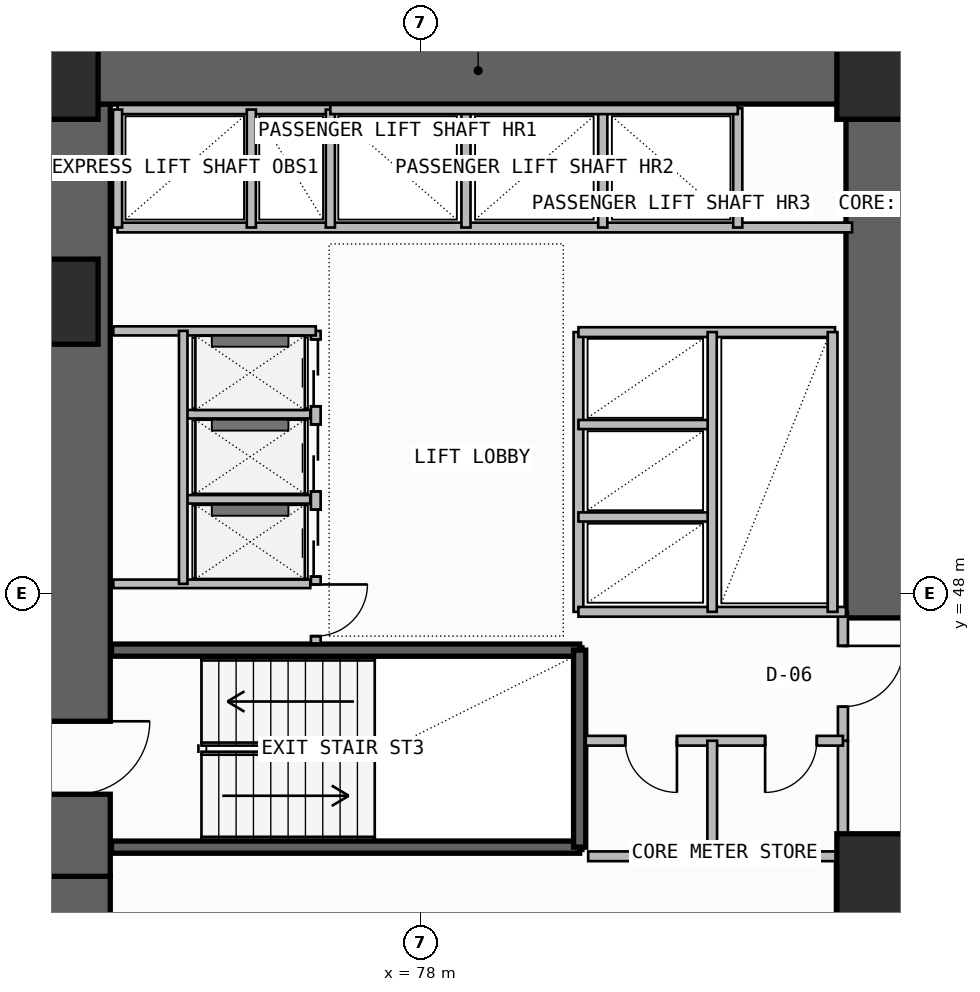
"""IFC4 building model, lengths in metres.
Left out: names, types, materials, properties, quantities, classifications, styles, units other than length and angle.
Written with IfcOpenShell. Run it as: python <this file> out.ifc"""

import sys

from ifc_helpers import new_model, si_unit, direction, frame, frame_2d, origin, origin_2d, place, context, subcontext, project, spatial, rectangle, extrude, element, fill, save


model = new_model("IFC4")
c1 = context("Model", 3, precision=1e-05, world=origin(), true_north=direction((0.0, 1.0)))
c2 = subcontext(c1, "Body", "Model", "MODEL_VIEW")
j1 = project(units=[si_unit("LENGTHUNIT", "METRE"), si_unit("PLANEANGLEUNIT", "RADIAN")], contexts=[c1])
p1 = place(None, origin())
s1 = spatial("IfcSite", under=j1, at=p1, CompositionType="ELEMENT")
p2 = place(p1, origin())
s2 = spatial("IfcBuilding", under=s1, at=p2, CompositionType="ELEMENT")
p3 = place(p2, frame((0.0, 0.0, 33.9)))
s3 = spatial("IfcBuildingStorey", under=s2, at=p3, CompositionType="ELEMENT", Elevation=33.9)
p4 = place(p3, frame((72.35, 35.5, -0.2), z_axis=(0.0, 0.0, 1.0), x_axis=(0.0, 1.0, 0.0)))
e1 = element("IfcWall", 1, at=p4, inside=s3, PredefinedType="SHEAR", context=c2, shape_type="SweptSolid", body=[
    extrude(rectangle(XDim=7.85, YDim=1.1, at=frame_2d((3.925, 0.0))), origin(), (0.0, 0.0, 1.0), 3.54),
])
p5 = place(p4, frame((1.45, 0.0, 0.2)))
e2 = element("IfcOpeningElement", 2, at=p5, cuts=e1, PredefinedType="OPENING", context=c2, shape_type="SweptSolid", body=[
    extrude(rectangle(XDim=1.2, YDim=2.2, at=frame_2d((0.6, 1.1))), frame((0.0, 0.56, 0.0), z_axis=(0.0, -1.0, 0.0), x_axis=(1.0, 0.0, 0.0)), (0.0, 0.0, 1.0), 1.12),
])
p6 = place(p3, frame((72.35, 43.35, -0.2), z_axis=(0.0, 0.0, 1.0), x_axis=(0.0, 1.0, 0.0)))
e3 = element("IfcWall", 3, at=p6, inside=s3, PredefinedType="SHEAR", context=c2, shape_type="SweptSolid", body=[
    extrude(rectangle(XDim=12.7, YDim=1.1, at=frame_2d((6.35, 0.0))), origin(), (0.0, 0.0, 1.0), 3.54),
])
p7 = place(p6, frame((1.35, 0.0, 0.2)))
e4 = element("IfcOpeningElement", 4, at=p7, cuts=e3, PredefinedType="OPENING", context=c2, shape_type="SweptSolid", body=[
    extrude(rectangle(XDim=1.2, YDim=2.2, at=frame_2d((0.6, 1.1))), frame((0.0, 0.56, 0.0), z_axis=(0.0, -1.0, 0.0), x_axis=(1.0, 0.0, 0.0)), (0.0, 0.0, 1.0), 1.12),
])
p8 = place(p3, frame((71.8, 56.6, -0.2), z_axis=(0.0, 0.0, 1.0), x_axis=(1.0, 0.0, 0.0)))
e5 = element("IfcWall", 5, at=p8, inside=s3, PredefinedType="SHEAR", context=c2, shape_type="SweptSolid", body=[
    extrude(rectangle(XDim=14.3, YDim=1.1, at=frame_2d((7.15, 0.0))), origin(), (0.0, 0.0, 1.0), 3.54),
])
p9 = place(p3, frame((85.55, 47.6, -0.2), z_axis=(0.0, 0.0, 1.0), x_axis=(0.0, 1.0, 0.0)))
e6 = element("IfcWall", 6, at=p9, inside=s3, PredefinedType="SHEAR", context=c2, shape_type="SweptSolid", body=[
    extrude(rectangle(XDim=8.45, YDim=1.1, at=frame_2d((4.225, 0.0))), origin(), (0.0, 0.0, 1.0), 3.54),
])
for number, where, z_axis, x_axis in (
    (7, (85.55, 43.35, 0.0), (0.0, 0.0, 1.0), (1.0, 0.0, 0.0)),
    (8, (72.0, 52.8, 0.0), (0.0, 0.0, 1.0), (1.0, 0.0, 0.0)),
    (9, (72.0, 56.5, 0.0), (0.0, 0.0, 1.0), (1.0, 0.0, 0.0)),
    (10, (85.55, 56.5, 0.0), (0.0, 0.0, 1.0), (1.0, 0.0, 0.0)),
):
    element("IfcColumn", number, at=place(p3, frame(where, z_axis=z_axis, x_axis=x_axis)), inside=s3, PredefinedType="COLUMN", context=c2, shape_type="SweptSolid", body=[
        extrude(rectangle(XDim=1.4, YDim=1.4, at=origin_2d()), origin(), (0.0, 0.0, 1.0), 3.6),
    ])
p10 = place(p3, frame((84.92, 38.85, 0.0), z_axis=(0.0, 0.0, 1.0), x_axis=(0.0, 1.0, 0.0)))
e11 = element("IfcWall", 11, at=p10, inside=s3, PredefinedType="SOLIDWALL", context=c2, shape_type="SweptSolid", body=[
    extrude(rectangle(XDim=4.83, YDim=0.2, at=frame_2d((2.415, 0.0))), origin(), (0.0, 0.0, 1.0), 3.34),
])
p11 = place(p10, frame((1.25, 0.0, 0.0)))
e12 = element("IfcOpeningElement", 12, at=p11, cuts=e11, PredefinedType="OPENING", context=c2, shape_type="SweptSolid", body=[
    extrude(rectangle(XDim=1.1, YDim=2.2, at=frame_2d((0.55, 1.1))), frame((0.0, 0.11, 0.0), z_axis=(0.0, -1.0, 0.0), x_axis=(1.0, 0.0, 0.0)), (0.0, 0.0, 1.0), 0.22),
])
for number, where, z_axis, x_axis in (
    (13, (72.92, 43.83, -0.2), (0.0, 0.0, 1.0), (1.0, 0.0, 0.0)),
    (14, (72.92, 47.07, -0.2), (0.0, 0.0, 1.0), (1.0, 0.0, 0.0)),
):
    element("IfcWall", number, at=place(p3, frame(where, z_axis=z_axis, x_axis=x_axis)), inside=s3, PredefinedType="SOLIDWALL", context=c2, shape_type="SweptSolid", body=[
        extrude(rectangle(XDim=7.7, YDim=0.2, at=frame_2d((3.85, 0.0))), origin(), (0.0, 0.0, 1.0), 3.54),
    ])
p12 = place(p3, frame((80.62, 43.83, -0.2), z_axis=(0.0, 0.0, 1.0), x_axis=(0.0, 1.0, 0.0)))
e15 = element("IfcWall", 15, at=p12, inside=s3, PredefinedType="SOLIDWALL", context=c2, shape_type="SweptSolid", body=[
    extrude(rectangle(XDim=3.24, YDim=0.2, at=frame_2d((1.62, 0.0))), origin(), (0.0, 0.0, 1.0), 3.54),
])
p13 = place(p3, frame((84.95, 43.68, 0.0), z_axis=(0.0, 0.0, 1.0), x_axis=(0.0, 1.0, 0.0)))
e16 = element("IfcWall", 16, at=p13, inside=s3, PredefinedType="PLUMBINGWALL", context=c2, shape_type="SweptSolid", body=[
    extrude(rectangle(XDim=1.9, YDim=0.165, at=frame_2d((0.95, 0.0))), origin(), (0.0, 0.0, 1.0), 3.34),
])
p14 = place(p3, frame((84.95, 45.58, 0.0), z_axis=(0.0, 0.0, 1.0), x_axis=(0.0, 1.0, 0.0)))
e17 = element("IfcWall", 17, at=p14, inside=s3, PredefinedType="PARTITIONING", context=c2, shape_type="SweptSolid", body=[
    extrude(rectangle(XDim=2.12, YDim=0.165, at=frame_2d((1.06, 0.0))), origin(), (0.0, 0.0, 1.0), 3.34),
])
p15 = place(p14, frame((0.56, 0.0, 0.0)))
e18 = element("IfcOpeningElement", 18, at=p15, cuts=e17, PredefinedType="OPENING", context=c2, shape_type="SweptSolid", body=[
    extrude(rectangle(XDim=1.0, YDim=2.2, at=frame_2d((0.5, 1.1))), frame((0.0, 0.093, 0.0), z_axis=(0.0, -1.0, 0.0), x_axis=(1.0, 0.0, 0.0)), (0.0, 0.0, 1.0), 0.185),
])
p16 = place(p3, frame((80.72, 45.58, 0.0), z_axis=(0.0, 0.0, 1.0), x_axis=(1.0, 0.0, 0.0)))
e19 = element("IfcWall", 19, at=p16, inside=s3, PredefinedType="PLUMBINGWALL", context=c2, shape_type="SweptSolid", body=[
    extrude(rectangle(XDim=4.23, YDim=0.16, at=frame_2d((2.115, 0.0))), origin(), (0.0, 0.0, 1.0), 3.34),
])
p17 = place(p16, frame((0.65, 0.0, 0.0)))
e20 = element("IfcOpeningElement", 20, at=p17, cuts=e19, PredefinedType="OPENING", context=c2, shape_type="SweptSolid", body=[
    extrude(rectangle(XDim=0.85, YDim=2.05, at=frame_2d((0.425, 1.025))), frame((0.0, 0.09, 0.0), z_axis=(0.0, -1.0, 0.0), x_axis=(1.0, 0.0, 0.0)), (0.0, 0.0, 1.0), 0.18),
])
p18 = place(p16, frame((2.95, 0.0, 0.0)))
e21 = element("IfcOpeningElement", 21, at=p18, cuts=e19, PredefinedType="OPENING", context=c2, shape_type="SweptSolid", body=[
    extrude(rectangle(XDim=0.85, YDim=2.05, at=frame_2d((0.425, 1.025))), frame((0.0, 0.09, 0.0), z_axis=(0.0, -1.0, 0.0), x_axis=(1.0, 0.0, 0.0)), (0.0, 0.0, 1.0), 0.18),
])
p19 = place(p3, frame((80.76, 43.68, 0.0), z_axis=(0.0, 0.0, 1.0), x_axis=(1.0, 0.0, 0.0)))
e22 = element("IfcWall", 22, at=p19, inside=s3, PredefinedType="PLUMBINGWALL", context=c2, shape_type="SweptSolid", body=[
    extrude(rectangle(XDim=4.19, YDim=0.16, at=frame_2d((2.095, 0.0))), origin(), (0.0, 0.0, 1.0), 3.34),
])
p20 = place(p3, frame((82.8, 43.68, 0.0), z_axis=(0.0, 0.0, 1.0), x_axis=(0.0, 1.0, 0.0)))
e23 = element("IfcWall", 23, at=p20, inside=s3, PredefinedType="PLUMBINGWALL", context=c2, shape_type="SweptSolid", body=[
    extrude(rectangle(XDim=1.9, YDim=0.16, at=frame_2d((0.95, 0.0))), origin(), (0.0, 0.0, 1.0), 3.34),
])
p21 = place(p3, frame((76.28, 47.18, 0.0), z_axis=(0.0, 0.0, 1.0), x_axis=(0.0, 1.0, 0.0)))
e24 = element("IfcWall", 24, at=p21, inside=s3, PredefinedType="SOLIDWALL", context=c2, shape_type="SweptSolid", body=[
    extrude(rectangle(XDim=5.14, YDim=0.16, at=frame_2d((2.57, 0.0))), origin(), (0.0, 0.0, 1.0), 3.34),
])
p22 = place(p21, frame((1.1, 0.0, 0.0)))
e25 = element("IfcOpeningElement", 25, at=p22, cuts=e24, PredefinedType="OPENING", context=c2, shape_type="SweptSolid", body=[
    extrude(rectangle(XDim=1.1, YDim=2.25, at=frame_2d((0.55, 1.125))), frame((0.0, 0.09, 0.0), z_axis=(0.0, -1.0, 0.0), x_axis=(1.0, 0.0, 0.0)), (0.0, 0.0, 1.0), 0.18),
])
p23 = place(p21, frame((2.5, 0.0, 0.0)))
e26 = element("IfcOpeningElement", 26, at=p23, cuts=e24, PredefinedType="OPENING", context=c2, shape_type="SweptSolid", body=[
    extrude(rectangle(XDim=1.1, YDim=2.25, at=frame_2d((0.55, 1.125))), frame((0.0, 0.09, 0.0), z_axis=(0.0, -1.0, 0.0), x_axis=(1.0, 0.0, 0.0)), (0.0, 0.0, 1.0), 0.18),
])
p24 = place(p21, frame((3.9, 0.0, 0.0)))
e27 = element("IfcOpeningElement", 27, at=p24, cuts=e24, PredefinedType="OPENING", context=c2, shape_type="SweptSolid", body=[
    extrude(rectangle(XDim=1.1, YDim=2.25, at=frame_2d((0.55, 1.125))), frame((0.0, 0.09, 0.0), z_axis=(0.0, -1.0, 0.0), x_axis=(1.0, 0.0, 0.0)), (0.0, 0.0, 1.0), 0.18),
])
p25 = place(p21, frame((0.12, 0.0, 0.0)))
e28 = element("IfcOpeningElement", 28, at=p25, cuts=e24, PredefinedType="OPENING", context=c2, shape_type="SweptSolid", body=[
    extrude(rectangle(XDim=0.85, YDim=2.05, at=frame_2d((0.425, 1.025))), frame((0.0, 0.09, 0.0), z_axis=(0.0, -1.0, 0.0), x_axis=(1.0, 0.0, 0.0)), (0.0, 0.0, 1.0), 0.18),
])
p26 = place(p3, frame((72.95, 52.32, 0.0), z_axis=(0.0, 0.0, 1.0), x_axis=(1.0, 0.0, 0.0)))
e29 = element("IfcWall", 29, at=p26, inside=s3, PredefinedType="SOLIDWALL", context=c2, shape_type="SweptSolid", body=[
    extrude(rectangle(XDim=3.33, YDim=0.15, at=frame_2d((1.665, 0.0))), origin(), (0.0, 0.0, 1.0), 3.34),
])
p27 = place(p3, frame((72.95, 48.16, 0.0), z_axis=(0.0, 0.0, 1.0), x_axis=(1.0, 0.0, 0.0)))
e30 = element("IfcWall", 30, at=p27, inside=s3, PredefinedType="PLUMBINGWALL", context=c2, shape_type="SweptSolid", body=[
    extrude(rectangle(XDim=3.24, YDim=0.14, at=frame_2d((1.62, 0.0))), origin(), (0.0, 0.0, 1.0), 3.34),
])
for number, where, z_axis, x_axis in (
    (31, (74.15, 49.55, 0.0), (0.0, 0.0, 1.0), (1.0, 0.0, 0.0)),
    (32, (74.15, 50.95, 0.0), (0.0, 0.0, 1.0), (1.0, 0.0, 0.0)),
):
    element("IfcWall", number, at=place(p3, frame(where, z_axis=z_axis, x_axis=x_axis)), inside=s3, PredefinedType="PLUMBINGWALL", context=c2, shape_type="SweptSolid", body=[
        extrude(rectangle(XDim=2.04, YDim=0.14, at=frame_2d((1.02, 0.0))), origin(), (0.0, 0.0, 1.0), 3.34),
    ])
p28 = place(p3, frame((74.1, 48.16, 0.0), z_axis=(0.0, 0.0, 1.0), x_axis=(0.0, 1.0, 0.0)))
e33 = element("IfcWall", 33, at=p28, inside=s3, PredefinedType="PLUMBINGWALL", context=c2, shape_type="SweptSolid", body=[
    extrude(rectangle(XDim=4.16, YDim=0.14, at=frame_2d((2.08, 0.0))), origin(), (0.0, 0.0, 1.0), 3.34),
])
p29 = place(p3, frame((80.6, 47.7, 0.0), z_axis=(0.0, 0.0, 1.0), x_axis=(0.0, 1.0, 0.0)))
e34 = element("IfcWall", 34, at=p29, inside=s3, PredefinedType="SOLIDWALL", context=c2, shape_type="SweptSolid", body=[
    extrude(rectangle(XDim=4.6, YDim=0.16, at=frame_2d((2.3, 0.0))), origin(), (0.0, 0.0, 1.0), 3.34),
])
p30 = place(p3, frame((80.6, 47.7, 0.0), z_axis=(0.0, 0.0, 1.0), x_axis=(1.0, 0.0, 0.0)))
e35 = element("IfcWall", 35, at=p30, inside=s3, PredefinedType="SOLIDWALL", context=c2, shape_type="SweptSolid", body=[
    extrude(rectangle(XDim=4.4, YDim=0.16, at=frame_2d((2.2, 0.0))), origin(), (0.0, 0.0, 1.0), 3.34),
])
p31 = place(p3, frame((80.6, 52.3, 0.0), z_axis=(0.0, 0.0, 1.0), x_axis=(1.0, 0.0, 0.0)))
e36 = element("IfcWall", 36, at=p31, inside=s3, PredefinedType="SOLIDWALL", context=c2, shape_type="SweptSolid", body=[
    extrude(rectangle(XDim=4.22, YDim=0.16, at=frame_2d((2.11, 0.0))), origin(), (0.0, 0.0, 1.0), 3.34),
])
for number, where, z_axis, x_axis in (
    (37, (80.6, 49.26, 0.0), (0.0, 0.0, 1.0), (1.0, 0.0, 0.0)),
    (38, (80.6, 50.78, 0.0), (0.0, 0.0, 1.0), (1.0, 0.0, 0.0)),
):
    element("IfcWall", number, at=place(p3, frame(where, z_axis=z_axis, x_axis=x_axis)), inside=s3, PredefinedType="PLUMBINGWALL", context=c2, shape_type="SweptSolid", body=[
        extrude(rectangle(XDim=2.2, YDim=0.15, at=frame_2d((1.1, 0.0))), origin(), (0.0, 0.0, 1.0), 3.34),
    ])
p32 = place(p3, frame((82.8, 47.7, 0.0), z_axis=(0.0, 0.0, 1.0), x_axis=(0.0, 1.0, 0.0)))
e39 = element("IfcWall", 39, at=p32, inside=s3, PredefinedType="PLUMBINGWALL", context=c2, shape_type="SweptSolid", body=[
    extrude(rectangle(XDim=4.6, YDim=0.15, at=frame_2d((2.3, 0.0))), origin(), (0.0, 0.0, 1.0), 3.34),
])
p33 = place(p3, frame((84.78, 47.7, 0.0), z_axis=(0.0, 0.0, 1.0), x_axis=(0.0, 1.0, 0.0)))
e40 = element("IfcWall", 40, at=p33, inside=s3, PredefinedType="SOLIDWALL", context=c2, shape_type="SweptSolid", body=[
    extrude(rectangle(XDim=4.6, YDim=0.16, at=frame_2d((2.3, 0.0))), origin(), (0.0, 0.0, 1.0), 3.34),
])
p34 = place(p3, frame((73.02, 54.02, 0.0), z_axis=(0.0, 0.0, 1.0), x_axis=(1.0, 0.0, 0.0)))
e41 = element("IfcWall", 41, at=p34, inside=s3, PredefinedType="SOLIDWALL", context=c2, shape_type="SweptSolid", body=[
    extrude(rectangle(XDim=12.08, YDim=0.16, at=frame_2d((6.04, 0.0))), origin(), (0.0, 0.0, 1.0), 3.34),
])
p35 = place(p3, frame((73.02, 55.96, 0.0), z_axis=(0.0, 0.0, 1.0), x_axis=(1.0, 0.0, 0.0)))
e42 = element("IfcWall", 42, at=p35, inside=s3, PredefinedType="SOLIDWALL", context=c2, shape_type="SweptSolid", body=[
    extrude(rectangle(XDim=3.5, YDim=0.15, at=frame_2d((1.75, 0.0))), origin(), (0.0, 0.0, 1.0), 3.34),
])
p36 = place(p3, frame((73.02, 54.02, 0.0), z_axis=(0.0, 0.0, 1.0), x_axis=(0.0, 1.0, 0.0)))
e43 = element("IfcWall", 43, at=p36, inside=s3, PredefinedType="PLUMBINGWALL", context=c2, shape_type="SweptSolid", body=[
    extrude(rectangle(XDim=1.94, YDim=0.15, at=frame_2d((0.97, 0.0))), origin(), (0.0, 0.0, 1.0), 3.34),
])
p37 = place(p3, frame((76.52, 54.02, 0.0), z_axis=(0.0, 0.0, 1.0), x_axis=(0.0, 1.0, 0.0)))
e44 = element("IfcWall", 44, at=p37, inside=s3, PredefinedType="SOLIDWALL", context=c2, shape_type="SweptSolid", body=[
    extrude(rectangle(XDim=1.94, YDim=0.15, at=frame_2d((0.97, 0.0))), origin(), (0.0, 0.0, 1.0), 3.34),
])
p38 = place(p3, frame((75.22, 54.02, 0.0), z_axis=(0.0, 0.0, 1.0), x_axis=(0.0, 1.0, 0.0)))
e45 = element("IfcWall", 45, at=p38, inside=s3, PredefinedType="PLUMBINGWALL", context=c2, shape_type="SweptSolid", body=[
    extrude(rectangle(XDim=1.94, YDim=0.15, at=frame_2d((0.97, 0.0))), origin(), (0.0, 0.0, 1.0), 3.34),
])
for number, where, z_axis, x_axis in (
    (46, (78.75, 54.02, 0.0), (0.0, 0.0, 1.0), (0.0, 1.0, 0.0)),
    (47, (81.0, 54.02, 0.0), (0.0, 0.0, 1.0), (0.0, 1.0, 0.0)),
):
    element("IfcWall", number, at=place(p3, frame(where, z_axis=z_axis, x_axis=x_axis)), inside=s3, PredefinedType="PLUMBINGWALL", context=c2, shape_type="SweptSolid", body=[
        extrude(rectangle(XDim=1.96, YDim=0.15, at=frame_2d((0.98, 0.0))), origin(), (0.0, 0.0, 1.0), 3.34),
    ])
p39 = place(p3, frame((83.22, 54.02, 0.0), z_axis=(0.0, 0.0, 1.0), x_axis=(0.0, 1.0, 0.0)))
e48 = element("IfcWall", 48, at=p39, inside=s3, PredefinedType="SOLIDWALL", context=c2, shape_type="SweptSolid", body=[
    extrude(rectangle(XDim=1.96, YDim=0.15, at=frame_2d((0.98, 0.0))), origin(), (0.0, 0.0, 1.0), 3.34),
])
p40 = place(p3, frame((76.52, 55.96, 0.0), z_axis=(0.0, 0.0, 1.0), x_axis=(1.0, 0.0, 0.0)))
e49 = element("IfcWall", 49, at=p40, inside=s3, PredefinedType="SOLIDWALL", context=c2, shape_type="SweptSolid", body=[
    extrude(rectangle(XDim=6.7, YDim=0.15, at=frame_2d((3.35, 0.0))), origin(), (0.0, 0.0, 1.0), 3.34),
])
p41 = place(p7, frame((1.2, 0.0, 0.0), z_axis=(0.0, 0.0, 1.0), x_axis=(-1.0, 0.0, 0.0)))
e50 = element("IfcDoor", 50, at=p41, inside=s3, OperationType="SINGLE_SWING_LEFT", PredefinedType="USERDEFINED", context=c2, shape_type="SweptSolid", body=[
    extrude(rectangle(XDim=1.2, YDim=2.2, at=frame_2d((0.6, 1.1))), frame((0.0, 0.025, 0.0), z_axis=(0.0, -1.0, 0.0), x_axis=(1.0, 0.0, 0.0)), (0.0, 0.0, 1.0), 0.05),
])
fill(e4, e50)
p42 = place(p15, frame((1.0, 0.0, 0.0), z_axis=(0.0, 0.0, 1.0), x_axis=(-1.0, 0.0, 0.0)))
e51 = element("IfcDoor", 51, at=p42, inside=s3, OperationType="SINGLE_SWING_LEFT", PredefinedType="DOOR", context=c2, shape_type="SweptSolid", body=[
    extrude(rectangle(XDim=1.0, YDim=2.2, at=frame_2d((0.5, 1.1))), frame((0.0, 0.025, 0.0), z_axis=(0.0, -1.0, 0.0), x_axis=(1.0, 0.0, 0.0)), (0.0, 0.0, 1.0), 0.05),
])
fill(e18, e51)
p43 = place(p17, frame((0.85, 0.0, 0.0), z_axis=(0.0, 0.0, 1.0), x_axis=(-1.0, 0.0, 0.0)))
e52 = element("IfcDoor", 52, at=p43, inside=s3, OperationType="SINGLE_SWING_LEFT", PredefinedType="DOOR", context=c2, shape_type="SweptSolid", body=[
    extrude(rectangle(XDim=0.85, YDim=2.05, at=frame_2d((0.425, 1.025))), frame((0.0, 0.025, 0.0), z_axis=(0.0, -1.0, 0.0), x_axis=(1.0, 0.0, 0.0)), (0.0, 0.0, 1.0), 0.05),
])
fill(e20, e52)
p44 = place(p18, frame((0.85, 0.0, 0.0), z_axis=(0.0, 0.0, 1.0), x_axis=(-1.0, 0.0, 0.0)))
e53 = element("IfcDoor", 53, at=p44, inside=s3, OperationType="SINGLE_SWING_RIGHT", PredefinedType="DOOR", context=c2, shape_type="SweptSolid", body=[
    extrude(rectangle(XDim=0.85, YDim=2.05, at=frame_2d((0.425, 1.025))), frame((0.0, 0.025, 0.0), z_axis=(0.0, -1.0, 0.0), x_axis=(1.0, 0.0, 0.0)), (0.0, 0.0, 1.0), 0.05),
])
fill(e21, e53)
p45 = place(p22, origin())
e54 = element("IfcDoor", 54, at=p45, inside=s3, OperationType="DOUBLE_DOOR_SLIDING", PredefinedType="DOOR", context=c2, shape_type="SweptSolid", body=[
    extrude(rectangle(XDim=1.1, YDim=2.25, at=frame_2d((0.55, 1.125))), frame((0.0, 0.025, 0.0), z_axis=(0.0, -1.0, 0.0), x_axis=(1.0, 0.0, 0.0)), (0.0, 0.0, 1.0), 0.05),
])
fill(e25, e54)
p46 = place(p23, origin())
e55 = element("IfcDoor", 55, at=p46, inside=s3, OperationType="DOUBLE_DOOR_SLIDING", PredefinedType="DOOR", context=c2, shape_type="SweptSolid", body=[
    extrude(rectangle(XDim=1.1, YDim=2.25, at=frame_2d((0.55, 1.125))), frame((0.0, 0.025, 0.0), z_axis=(0.0, -1.0, 0.0), x_axis=(1.0, 0.0, 0.0)), (0.0, 0.0, 1.0), 0.05),
])
fill(e26, e55)
p47 = place(p24, origin())
e56 = element("IfcDoor", 56, at=p47, inside=s3, OperationType="DOUBLE_DOOR_SLIDING", PredefinedType="DOOR", context=c2, shape_type="SweptSolid", body=[
    extrude(rectangle(XDim=1.1, YDim=2.25, at=frame_2d((0.55, 1.125))), frame((0.0, 0.025, 0.0), z_axis=(0.0, -1.0, 0.0), x_axis=(1.0, 0.0, 0.0)), (0.0, 0.0, 1.0), 0.05),
])
fill(e27, e56)
p48 = place(p25, frame((0.85, 0.0, 0.0), z_axis=(0.0, 0.0, 1.0), x_axis=(-1.0, 0.0, 0.0)))
e57 = element("IfcDoor", 57, at=p48, inside=s3, OperationType="SINGLE_SWING_LEFT", PredefinedType="DOOR", context=c2, shape_type="SweptSolid", body=[
    extrude(rectangle(XDim=0.85, YDim=2.05, at=frame_2d((0.425, 1.025))), frame((0.0, 0.025, 0.0), z_axis=(0.0, -1.0, 0.0), x_axis=(1.0, 0.0, 0.0)), (0.0, 0.0, 1.0), 0.05),
])
fill(e28, e57)
save(model, sys.argv[1])
